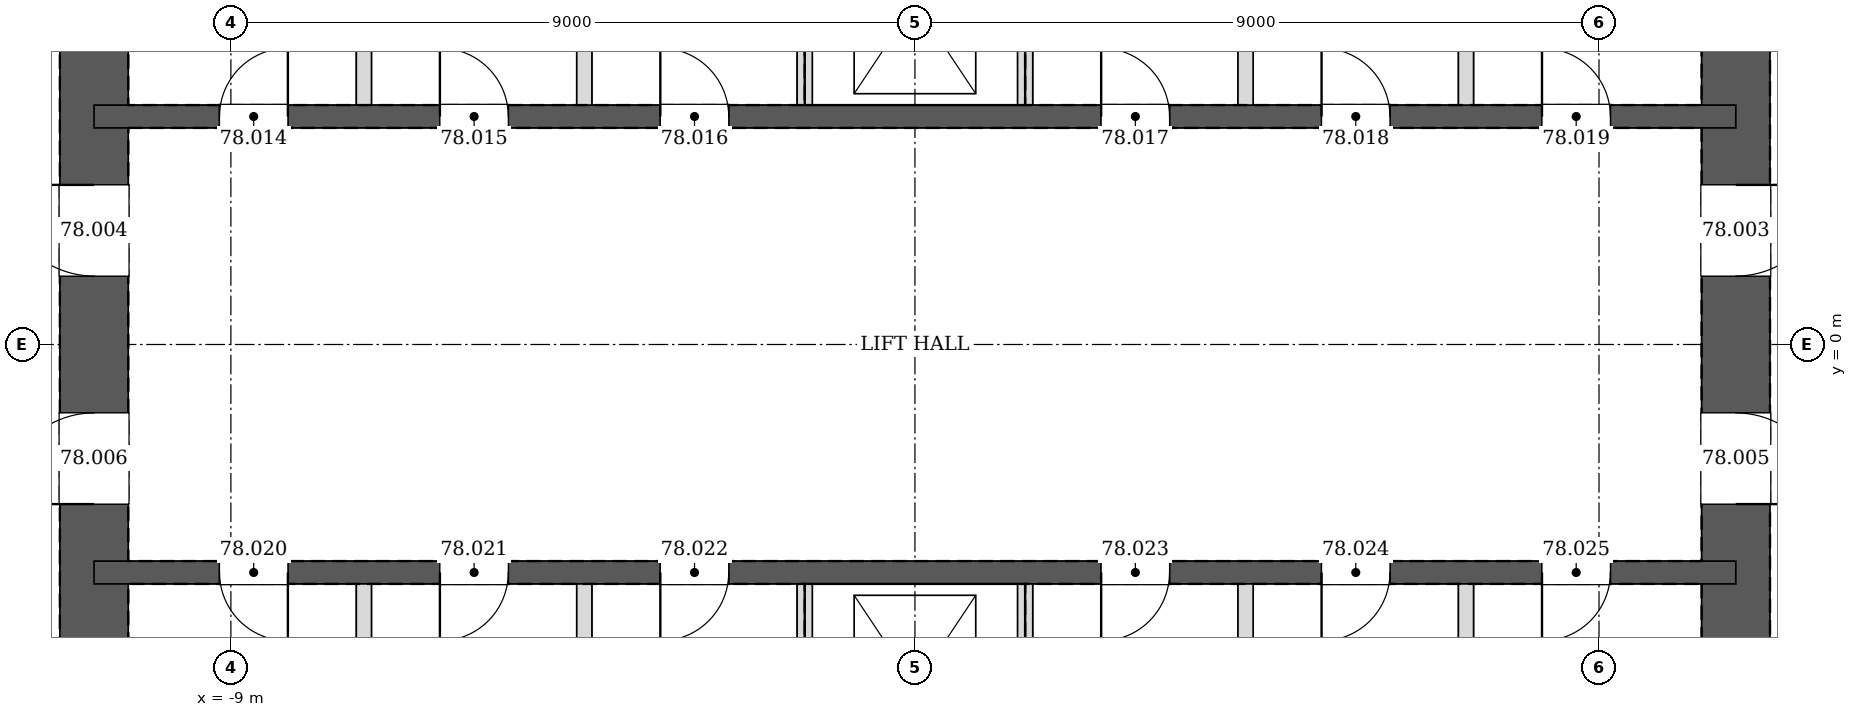
"""IFC4 building model, lengths in metres.
Left out: names, types, materials, properties, quantities, classifications, styles, units other than length and angle.
Written with IfcOpenShell. Run it as: python <this file> out.ifc"""

import sys

from ifc_helpers import new_model, si_unit, direction, frame, frame_2d, origin, place, context, subcontext, project, spatial, rectangle, extrude, element, fill, save


model = new_model("IFC4")
c1 = context("Model", 3, precision=1e-05, world=origin(), true_north=direction((0.0, 1.0)))
c2 = subcontext(c1, "Body", "Model", "MODEL_VIEW")
j1 = project(units=[si_unit("LENGTHUNIT", "METRE"), si_unit("PLANEANGLEUNIT", "RADIAN")], contexts=[c1])
p1 = place(None, origin())
s1 = spatial("IfcSite", under=j1, at=p1, CompositionType="ELEMENT")
p2 = place(p1, origin())
s2 = spatial("IfcBuilding", under=s1, at=p2, CompositionType="ELEMENT")
p3 = place(p2, frame((0.0, 0.0, 317.6)))
s3 = spatial("IfcBuildingStorey", under=s2, at=p3, CompositionType="ELEMENT", Elevation=317.6)
p4 = place(p3, frame((10.8, -10.8, 0.0), z_axis=(0.0, 0.0, 1.0), x_axis=(0.0, 1.0, 0.0)))
e1 = element("IfcWall", 1, at=p4, inside=s3, PredefinedType="SOLIDWALL", context=c2, shape_type="SweptSolid", body=[
    extrude(rectangle(XDim=21.6, YDim=0.9, at=frame_2d((10.8, 0.0))), origin(), (0.0, 0.0, 1.0), 6.0),
])
p5 = place(p4, frame((11.7, 0.0, 0.0)))
e2 = element("IfcOpeningElement", 2, at=p5, cuts=e1, PredefinedType="OPENING", context=c2, shape_type="SweptSolid", body=[
    extrude(rectangle(XDim=1.2, YDim=2.1, at=frame_2d((0.6, 1.05))), frame((0.0, 0.46, 0.0), z_axis=(0.0, -1.0, 0.0), x_axis=(1.0, 0.0, 0.0)), (0.0, 0.0, 1.0), 0.92),
])
p6 = place(p4, frame((8.7, 0.0, 0.0)))
e3 = element("IfcOpeningElement", 3, at=p6, cuts=e1, PredefinedType="OPENING", context=c2, shape_type="SweptSolid", body=[
    extrude(rectangle(XDim=1.2, YDim=2.1, at=frame_2d((0.6, 1.05))), frame((0.0, 0.46, 0.0), z_axis=(0.0, -1.0, 0.0), x_axis=(1.0, 0.0, 0.0)), (0.0, 0.0, 1.0), 0.92),
])
p7 = place(p3, frame((-10.8, 10.8, 0.0), z_axis=(0.0, 0.0, 1.0), x_axis=(0.0, -1.0, 0.0)))
e4 = element("IfcWall", 4, at=p7, inside=s3, PredefinedType="SOLIDWALL", context=c2, shape_type="SweptSolid", body=[
    extrude(rectangle(XDim=21.6, YDim=0.9, at=frame_2d((10.8, 0.0))), origin(), (0.0, 0.0, 1.0), 6.0),
])
p8 = place(p7, frame((8.7, 0.0, 0.0)))
e5 = element("IfcOpeningElement", 5, at=p8, cuts=e4, PredefinedType="OPENING", context=c2, shape_type="SweptSolid", body=[
    extrude(rectangle(XDim=1.2, YDim=2.1, at=frame_2d((0.6, 1.05))), frame((0.0, 0.46, 0.0), z_axis=(0.0, -1.0, 0.0), x_axis=(1.0, 0.0, 0.0)), (0.0, 0.0, 1.0), 0.92),
])
p9 = place(p7, frame((11.7, 0.0, 0.0)))
e6 = element("IfcOpeningElement", 6, at=p9, cuts=e4, PredefinedType="OPENING", context=c2, shape_type="SweptSolid", body=[
    extrude(rectangle(XDim=1.2, YDim=2.1, at=frame_2d((0.6, 1.05))), frame((0.0, 0.46, 0.0), z_axis=(0.0, -1.0, 0.0), x_axis=(1.0, 0.0, 0.0)), (0.0, 0.0, 1.0), 0.92),
])
p10 = place(p3, frame((-10.8, 3.0, 0.0), z_axis=(0.0, 0.0, 1.0), x_axis=(1.0, 0.0, 0.0)))
e7 = element("IfcWall", 7, at=p10, inside=s3, PredefinedType="SOLIDWALL", context=c2, shape_type="SweptSolid", body=[
    extrude(rectangle(XDim=21.6, YDim=0.3, at=frame_2d((10.8, 0.0))), origin(), (0.0, 0.0, 1.0), 6.0),
])
p11 = place(p10, frame((1.65, 0.0, 0.0)))
e8 = element("IfcOpeningElement", 8, at=p11, cuts=e7, PredefinedType="OPENING", context=c2, shape_type="SweptSolid", body=[
    extrude(rectangle(XDim=0.9, YDim=2.1, at=frame_2d((0.45, 1.05))), frame((0.0, 0.16, 0.0), z_axis=(0.0, -1.0, 0.0), x_axis=(1.0, 0.0, 0.0)), (0.0, 0.0, 1.0), 0.32),
])
p12 = place(p10, frame((4.55, 0.0, 0.0)))
e9 = element("IfcOpeningElement", 9, at=p12, cuts=e7, PredefinedType="OPENING", context=c2, shape_type="SweptSolid", body=[
    extrude(rectangle(XDim=0.9, YDim=2.1, at=frame_2d((0.45, 1.05))), frame((0.0, 0.16, 0.0), z_axis=(0.0, -1.0, 0.0), x_axis=(1.0, 0.0, 0.0)), (0.0, 0.0, 1.0), 0.32),
])
p13 = place(p10, frame((7.45, 0.0, 0.0)))
e10 = element("IfcOpeningElement", 10, at=p13, cuts=e7, PredefinedType="OPENING", context=c2, shape_type="SweptSolid", body=[
    extrude(rectangle(XDim=0.9, YDim=2.1, at=frame_2d((0.45, 1.05))), frame((0.0, 0.16, 0.0), z_axis=(0.0, -1.0, 0.0), x_axis=(1.0, 0.0, 0.0)), (0.0, 0.0, 1.0), 0.32),
])
p14 = place(p10, frame((13.25, 0.0, 0.0)))
e11 = element("IfcOpeningElement", 11, at=p14, cuts=e7, PredefinedType="OPENING", context=c2, shape_type="SweptSolid", body=[
    extrude(rectangle(XDim=0.9, YDim=2.1, at=frame_2d((0.45, 1.05))), frame((0.0, 0.16, 0.0), z_axis=(0.0, -1.0, 0.0), x_axis=(1.0, 0.0, 0.0)), (0.0, 0.0, 1.0), 0.32),
])
p15 = place(p10, frame((16.15, 0.0, 0.0)))
e12 = element("IfcOpeningElement", 12, at=p15, cuts=e7, PredefinedType="OPENING", context=c2, shape_type="SweptSolid", body=[
    extrude(rectangle(XDim=0.9, YDim=2.1, at=frame_2d((0.45, 1.05))), frame((0.0, 0.16, 0.0), z_axis=(0.0, -1.0, 0.0), x_axis=(1.0, 0.0, 0.0)), (0.0, 0.0, 1.0), 0.32),
])
p16 = place(p10, frame((19.05, 0.0, 0.0)))
e13 = element("IfcOpeningElement", 13, at=p16, cuts=e7, PredefinedType="OPENING", context=c2, shape_type="SweptSolid", body=[
    extrude(rectangle(XDim=0.9, YDim=2.1, at=frame_2d((0.45, 1.05))), frame((0.0, 0.16, 0.0), z_axis=(0.0, -1.0, 0.0), x_axis=(1.0, 0.0, 0.0)), (0.0, 0.0, 1.0), 0.32),
])
p17 = place(p3, frame((-10.8, -3.0, 0.0), z_axis=(0.0, 0.0, 1.0), x_axis=(1.0, 0.0, 0.0)))
e14 = element("IfcWall", 14, at=p17, inside=s3, PredefinedType="SOLIDWALL", context=c2, shape_type="SweptSolid", body=[
    extrude(rectangle(XDim=21.6, YDim=0.3, at=frame_2d((10.8, 0.0))), origin(), (0.0, 0.0, 1.0), 6.0),
])
p18 = place(p17, frame((1.65, 0.0, 0.0)))
e15 = element("IfcOpeningElement", 15, at=p18, cuts=e14, PredefinedType="OPENING", context=c2, shape_type="SweptSolid", body=[
    extrude(rectangle(XDim=0.9, YDim=2.1, at=frame_2d((0.45, 1.05))), frame((0.0, 0.16, 0.0), z_axis=(0.0, -1.0, 0.0), x_axis=(1.0, 0.0, 0.0)), (0.0, 0.0, 1.0), 0.32),
])
p19 = place(p17, frame((4.55, 0.0, 0.0)))
e16 = element("IfcOpeningElement", 16, at=p19, cuts=e14, PredefinedType="OPENING", context=c2, shape_type="SweptSolid", body=[
    extrude(rectangle(XDim=0.9, YDim=2.1, at=frame_2d((0.45, 1.05))), frame((0.0, 0.16, 0.0), z_axis=(0.0, -1.0, 0.0), x_axis=(1.0, 0.0, 0.0)), (0.0, 0.0, 1.0), 0.32),
])
p20 = place(p17, frame((7.45, 0.0, 0.0)))
e17 = element("IfcOpeningElement", 17, at=p20, cuts=e14, PredefinedType="OPENING", context=c2, shape_type="SweptSolid", body=[
    extrude(rectangle(XDim=0.9, YDim=2.1, at=frame_2d((0.45, 1.05))), frame((0.0, 0.16, 0.0), z_axis=(0.0, -1.0, 0.0), x_axis=(1.0, 0.0, 0.0)), (0.0, 0.0, 1.0), 0.32),
])
p21 = place(p17, frame((13.25, 0.0, 0.0)))
e18 = element("IfcOpeningElement", 18, at=p21, cuts=e14, PredefinedType="OPENING", context=c2, shape_type="SweptSolid", body=[
    extrude(rectangle(XDim=0.9, YDim=2.1, at=frame_2d((0.45, 1.05))), frame((0.0, 0.16, 0.0), z_axis=(0.0, -1.0, 0.0), x_axis=(1.0, 0.0, 0.0)), (0.0, 0.0, 1.0), 0.32),
])
p22 = place(p17, frame((16.15, 0.0, 0.0)))
e19 = element("IfcOpeningElement", 19, at=p22, cuts=e14, PredefinedType="OPENING", context=c2, shape_type="SweptSolid", body=[
    extrude(rectangle(XDim=0.9, YDim=2.1, at=frame_2d((0.45, 1.05))), frame((0.0, 0.16, 0.0), z_axis=(0.0, -1.0, 0.0), x_axis=(1.0, 0.0, 0.0)), (0.0, 0.0, 1.0), 0.32),
])
p23 = place(p17, frame((19.05, 0.0, 0.0)))
e20 = element("IfcOpeningElement", 20, at=p23, cuts=e14, PredefinedType="OPENING", context=c2, shape_type="SweptSolid", body=[
    extrude(rectangle(XDim=0.9, YDim=2.1, at=frame_2d((0.45, 1.05))), frame((0.0, 0.16, 0.0), z_axis=(0.0, -1.0, 0.0), x_axis=(1.0, 0.0, 0.0)), (0.0, 0.0, 1.0), 0.32),
])
for number, where, z_axis, x_axis in (
    (21, (-7.25, 3.15, 0.0), (0.0, 0.0, 1.0), (0.0, 1.0, 0.0)),
    (22, (-4.35, 3.15, 0.0), (0.0, 0.0, 1.0), (0.0, 1.0, 0.0)),
    (23, (-1.45, 3.15, 0.0), (0.0, 0.0, 1.0), (0.0, 1.0, 0.0)),
    (24, (1.45, 3.15, 0.0), (0.0, 0.0, 1.0), (0.0, 1.0, 0.0)),
    (25, (4.35, 3.15, 0.0), (0.0, 0.0, 1.0), (0.0, 1.0, 0.0)),
    (26, (7.25, 3.15, 0.0), (0.0, 0.0, 1.0), (0.0, 1.0, 0.0)),
    (27, (-7.25, -5.85, 0.0), (0.0, 0.0, 1.0), (0.0, 1.0, 0.0)),
    (28, (-4.35, -5.85, 0.0), (0.0, 0.0, 1.0), (0.0, 1.0, 0.0)),
    (29, (-1.45, -5.85, 0.0), (0.0, 0.0, 1.0), (0.0, 1.0, 0.0)),
    (30, (1.45, -5.85, 0.0), (0.0, 0.0, 1.0), (0.0, 1.0, 0.0)),
    (31, (4.35, -5.85, 0.0), (0.0, 0.0, 1.0), (0.0, 1.0, 0.0)),
    (32, (7.25, -5.85, 0.0), (0.0, 0.0, 1.0), (0.0, 1.0, 0.0)),
):
    element("IfcWall", number, at=place(p3, frame(where, z_axis=z_axis, x_axis=x_axis)), inside=s3, PredefinedType="PARTITIONING", context=c2, shape_type="SweptSolid", body=[
        extrude(rectangle(XDim=2.7, YDim=0.2, at=frame_2d((1.35, 0.0))), origin(), (0.0, 0.0, 1.0), 5.75),
    ])
p24 = place(p5, frame((1.2, 0.0, 0.0), z_axis=(0.0, 0.0, 1.0), x_axis=(-1.0, 0.0, 0.0)))
e33 = element("IfcDoor", 33, at=p24, inside=s3, OperationType="SINGLE_SWING_LEFT", PredefinedType="DOOR", context=c2, shape_type="SweptSolid", body=[
    extrude(rectangle(XDim=1.2, YDim=2.1, at=frame_2d((0.6, 1.05))), frame((0.0, 0.025, 0.0), z_axis=(0.0, -1.0, 0.0), x_axis=(1.0, 0.0, 0.0)), (0.0, 0.0, 1.0), 0.05),
])
fill(e2, e33)
p25 = place(p8, frame((1.2, 0.0, 0.0), z_axis=(0.0, 0.0, 1.0), x_axis=(-1.0, 0.0, 0.0)))
e34 = element("IfcDoor", 34, at=p25, inside=s3, OperationType="SINGLE_SWING_RIGHT", PredefinedType="DOOR", context=c2, shape_type="SweptSolid", body=[
    extrude(rectangle(XDim=1.2, YDim=2.1, at=frame_2d((0.6, 1.05))), frame((0.0, 0.025, 0.0), z_axis=(0.0, -1.0, 0.0), x_axis=(1.0, 0.0, 0.0)), (0.0, 0.0, 1.0), 0.05),
])
fill(e5, e34)
p26 = place(p6, frame((1.2, 0.0, 0.0), z_axis=(0.0, 0.0, 1.0), x_axis=(-1.0, 0.0, 0.0)))
e35 = element("IfcDoor", 35, at=p26, inside=s3, OperationType="SINGLE_SWING_RIGHT", PredefinedType="DOOR", context=c2, shape_type="SweptSolid", body=[
    extrude(rectangle(XDim=1.2, YDim=2.1, at=frame_2d((0.6, 1.05))), frame((0.0, 0.025, 0.0), z_axis=(0.0, -1.0, 0.0), x_axis=(1.0, 0.0, 0.0)), (0.0, 0.0, 1.0), 0.05),
])
fill(e3, e35)
p27 = place(p9, frame((1.2, 0.0, 0.0), z_axis=(0.0, 0.0, 1.0), x_axis=(-1.0, 0.0, 0.0)))
e36 = element("IfcDoor", 36, at=p27, inside=s3, OperationType="SINGLE_SWING_LEFT", PredefinedType="DOOR", context=c2, shape_type="SweptSolid", body=[
    extrude(rectangle(XDim=1.2, YDim=2.1, at=frame_2d((0.6, 1.05))), frame((0.0, 0.025, 0.0), z_axis=(0.0, -1.0, 0.0), x_axis=(1.0, 0.0, 0.0)), (0.0, 0.0, 1.0), 0.05),
])
fill(e6, e36)
p28 = place(p11, origin())
e37 = element("IfcDoor", 37, at=p28, inside=s3, OperationType="SINGLE_SWING_RIGHT", PredefinedType="DOOR", context=c2, shape_type="SweptSolid", body=[
    extrude(rectangle(XDim=0.9, YDim=2.1, at=frame_2d((0.45, 1.05))), frame((0.0, 0.025, 0.0), z_axis=(0.0, -1.0, 0.0), x_axis=(1.0, 0.0, 0.0)), (0.0, 0.0, 1.0), 0.05),
])
fill(e8, e37)
p29 = place(p12, origin())
e38 = element("IfcDoor", 38, at=p29, inside=s3, OperationType="SINGLE_SWING_LEFT", PredefinedType="DOOR", context=c2, shape_type="SweptSolid", body=[
    extrude(rectangle(XDim=0.9, YDim=2.1, at=frame_2d((0.45, 1.05))), frame((0.0, 0.025, 0.0), z_axis=(0.0, -1.0, 0.0), x_axis=(1.0, 0.0, 0.0)), (0.0, 0.0, 1.0), 0.05),
])
fill(e9, e38)
p30 = place(p13, origin())
e39 = element("IfcDoor", 39, at=p30, inside=s3, OperationType="SINGLE_SWING_LEFT", PredefinedType="DOOR", context=c2, shape_type="SweptSolid", body=[
    extrude(rectangle(XDim=0.9, YDim=2.1, at=frame_2d((0.45, 1.05))), frame((0.0, 0.025, 0.0), z_axis=(0.0, -1.0, 0.0), x_axis=(1.0, 0.0, 0.0)), (0.0, 0.0, 1.0), 0.05),
])
fill(e10, e39)
p31 = place(p14, origin())
e40 = element("IfcDoor", 40, at=p31, inside=s3, OperationType="SINGLE_SWING_LEFT", PredefinedType="DOOR", context=c2, shape_type="SweptSolid", body=[
    extrude(rectangle(XDim=0.9, YDim=2.1, at=frame_2d((0.45, 1.05))), frame((0.0, 0.025, 0.0), z_axis=(0.0, -1.0, 0.0), x_axis=(1.0, 0.0, 0.0)), (0.0, 0.0, 1.0), 0.05),
])
fill(e11, e40)
p32 = place(p15, origin())
e41 = element("IfcDoor", 41, at=p32, inside=s3, OperationType="SINGLE_SWING_LEFT", PredefinedType="DOOR", context=c2, shape_type="SweptSolid", body=[
    extrude(rectangle(XDim=0.9, YDim=2.1, at=frame_2d((0.45, 1.05))), frame((0.0, 0.025, 0.0), z_axis=(0.0, -1.0, 0.0), x_axis=(1.0, 0.0, 0.0)), (0.0, 0.0, 1.0), 0.05),
])
fill(e12, e41)
p33 = place(p16, origin())
e42 = element("IfcDoor", 42, at=p33, inside=s3, OperationType="SINGLE_SWING_LEFT", PredefinedType="DOOR", context=c2, shape_type="SweptSolid", body=[
    extrude(rectangle(XDim=0.9, YDim=2.1, at=frame_2d((0.45, 1.05))), frame((0.0, 0.025, 0.0), z_axis=(0.0, -1.0, 0.0), x_axis=(1.0, 0.0, 0.0)), (0.0, 0.0, 1.0), 0.05),
])
fill(e13, e42)
p34 = place(p18, frame((0.9, 0.0, 0.0), z_axis=(0.0, 0.0, 1.0), x_axis=(-1.0, 0.0, 0.0)))
e43 = element("IfcDoor", 43, at=p34, inside=s3, OperationType="SINGLE_SWING_LEFT", PredefinedType="DOOR", context=c2, shape_type="SweptSolid", body=[
    extrude(rectangle(XDim=0.9, YDim=2.1, at=frame_2d((0.45, 1.05))), frame((0.0, 0.025, 0.0), z_axis=(0.0, -1.0, 0.0), x_axis=(1.0, 0.0, 0.0)), (0.0, 0.0, 1.0), 0.05),
])
fill(e15, e43)
p35 = place(p19, frame((0.9, 0.0, 0.0), z_axis=(0.0, 0.0, 1.0), x_axis=(-1.0, 0.0, 0.0)))
e44 = element("IfcDoor", 44, at=p35, inside=s3, OperationType="SINGLE_SWING_RIGHT", PredefinedType="DOOR", context=c2, shape_type="SweptSolid", body=[
    extrude(rectangle(XDim=0.9, YDim=2.1, at=frame_2d((0.45, 1.05))), frame((0.0, 0.025, 0.0), z_axis=(0.0, -1.0, 0.0), x_axis=(1.0, 0.0, 0.0)), (0.0, 0.0, 1.0), 0.05),
])
fill(e16, e44)
p36 = place(p20, frame((0.9, 0.0, 0.0), z_axis=(0.0, 0.0, 1.0), x_axis=(-1.0, 0.0, 0.0)))
e45 = element("IfcDoor", 45, at=p36, inside=s3, OperationType="SINGLE_SWING_RIGHT", PredefinedType="DOOR", context=c2, shape_type="SweptSolid", body=[
    extrude(rectangle(XDim=0.9, YDim=2.1, at=frame_2d((0.45, 1.05))), frame((0.0, 0.025, 0.0), z_axis=(0.0, -1.0, 0.0), x_axis=(1.0, 0.0, 0.0)), (0.0, 0.0, 1.0), 0.05),
])
fill(e17, e45)
p37 = place(p21, frame((0.9, 0.0, 0.0), z_axis=(0.0, 0.0, 1.0), x_axis=(-1.0, 0.0, 0.0)))
e46 = element("IfcDoor", 46, at=p37, inside=s3, OperationType="SINGLE_SWING_RIGHT", PredefinedType="DOOR", context=c2, shape_type="SweptSolid", body=[
    extrude(rectangle(XDim=0.9, YDim=2.1, at=frame_2d((0.45, 1.05))), frame((0.0, 0.025, 0.0), z_axis=(0.0, -1.0, 0.0), x_axis=(1.0, 0.0, 0.0)), (0.0, 0.0, 1.0), 0.05),
])
fill(e18, e46)
p38 = place(p22, frame((0.9, 0.0, 0.0), z_axis=(0.0, 0.0, 1.0), x_axis=(-1.0, 0.0, 0.0)))
e47 = element("IfcDoor", 47, at=p38, inside=s3, OperationType="SINGLE_SWING_RIGHT", PredefinedType="DOOR", context=c2, shape_type="SweptSolid", body=[
    extrude(rectangle(XDim=0.9, YDim=2.1, at=frame_2d((0.45, 1.05))), frame((0.0, 0.025, 0.0), z_axis=(0.0, -1.0, 0.0), x_axis=(1.0, 0.0, 0.0)), (0.0, 0.0, 1.0), 0.05),
])
fill(e19, e47)
p39 = place(p23, frame((0.9, 0.0, 0.0), z_axis=(0.0, 0.0, 1.0), x_axis=(-1.0, 0.0, 0.0)))
e48 = element("IfcDoor", 48, at=p39, inside=s3, OperationType="SINGLE_SWING_RIGHT", PredefinedType="DOOR", context=c2, shape_type="SweptSolid", body=[
    extrude(rectangle(XDim=0.9, YDim=2.1, at=frame_2d((0.45, 1.05))), frame((0.0, 0.025, 0.0), z_axis=(0.0, -1.0, 0.0), x_axis=(1.0, 0.0, 0.0)), (0.0, 0.0, 1.0), 0.05),
])
fill(e20, e48)
save(model, sys.argv[1])
